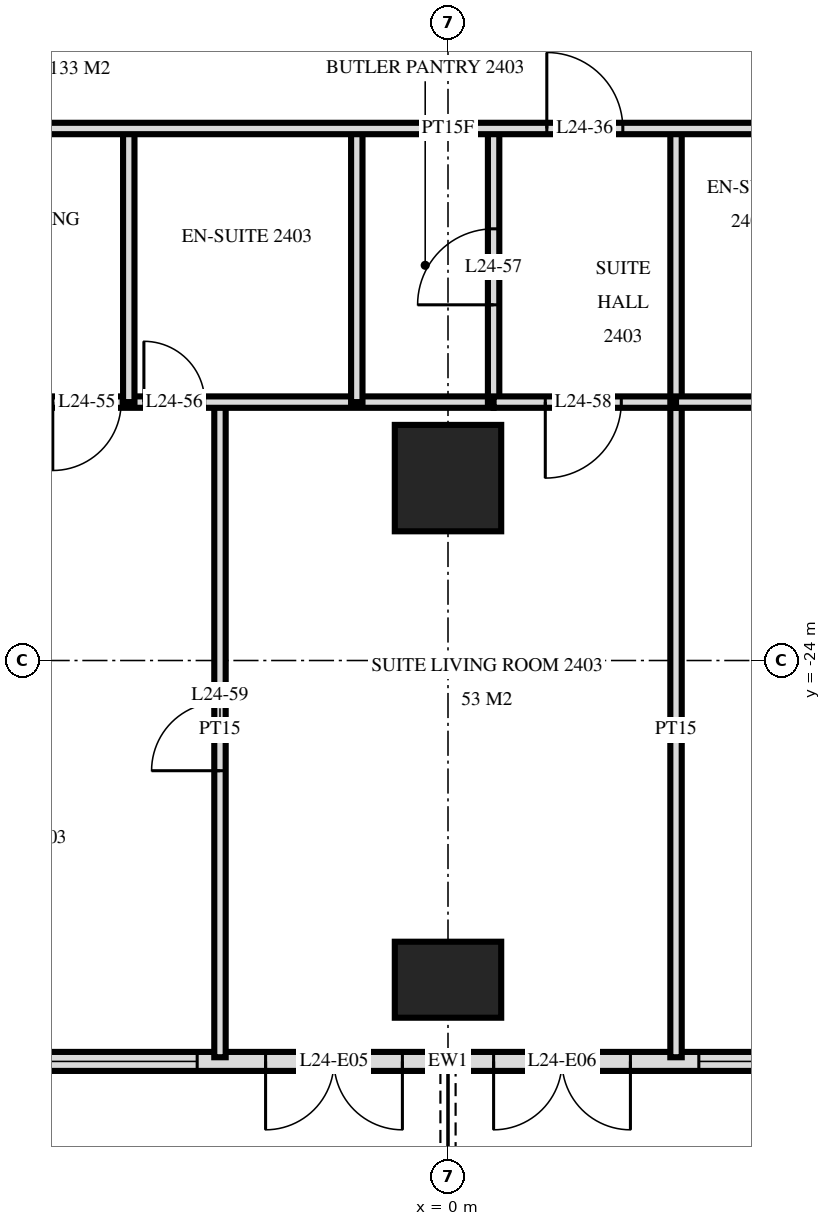
"""IFC4 building model, lengths in metres.
Left out: names, types, materials, properties, quantities, classifications, styles, units other than length and angle.
Written with IfcOpenShell. Run it as: python <this file> out.ifc"""

import sys

from ifc_helpers import new_model, si_unit, direction, frame, frame_2d, origin, origin_2d, place, context, subcontext, project, spatial, rectangle, extrude, element, fill, save


model = new_model("IFC4")
c1 = context("Model", 3, precision=1e-05, world=origin(), true_north=direction((0.0, 1.0)))
c2 = subcontext(c1, "Body", "Model", "MODEL_VIEW")
j1 = project(units=[si_unit("LENGTHUNIT", "METRE"), si_unit("PLANEANGLEUNIT", "RADIAN")], contexts=[c1])
p1 = place(None, origin())
s1 = spatial("IfcSite", under=j1, at=p1, CompositionType="ELEMENT")
p2 = place(p1, origin())
s2 = spatial("IfcBuilding", under=s1, at=p2, CompositionType="ELEMENT")
p3 = place(p2, frame((0.0, 0.0, 96.0)))
s3 = spatial("IfcBuildingStorey", under=s2, at=p3, CompositionType="ELEMENT", Elevation=96.0)
p4 = place(p3, frame((0.0, -28.2, 0.0), z_axis=(0.0, 0.0, 1.0), x_axis=(1.0, 0.0, 0.0)))
e1 = element("IfcColumn", 1, at=p4, inside=s3, PredefinedType="COLUMN", context=c2, shape_type="SweptSolid", body=[
    extrude(rectangle(XDim=1.4, YDim=1.0, at=origin_2d()), origin(), (0.0, 0.0, 1.0), 3.6),
])
p5 = place(p3, frame((0.0, -21.6, 0.0), z_axis=(0.0, 0.0, 1.0), x_axis=(1.0, 0.0, 0.0)))
e2 = element("IfcColumn", 2, at=p5, inside=s3, PredefinedType="COLUMN", context=c2, shape_type="SweptSolid", body=[
    extrude(rectangle(XDim=1.4, YDim=1.4, at=origin_2d()), origin(), (0.0, 0.0, 1.0), 3.6),
])
p6 = place(p3, frame((-28.775, -29.275, 0.0), z_axis=(0.0, 0.0, 1.0), x_axis=(1.0, 0.0, 0.0)))
e3 = element("IfcWall", 3, at=p6, inside=s3, PredefinedType="SOLIDWALL", context=c2, shape_type="SweptSolid", body=[
    extrude(rectangle(XDim=57.551, YDim=0.25, at=frame_2d((28.775, 0.0))), origin(), (0.0, 0.0, 1.0), 3.32),
])
p7 = place(p6, frame((0.575, 0.0, 0.0)))
e4 = element("IfcOpeningElement", 4, at=p7, cuts=e3, PredefinedType="OPENING", context=c2, shape_type="SweptSolid", body=[
    extrude(rectangle(XDim=1.8, YDim=2.4, at=frame_2d((0.9, 1.2))), frame((0.0, 0.135, 0.0), z_axis=(0.0, -1.0, 0.0), x_axis=(1.0, 0.0, 0.0)), (0.0, 0.0, 1.0), 0.27),
])
p8 = place(p6, frame((5.075, 0.0, 0.3)))
e5 = element("IfcOpeningElement", 5, at=p8, cuts=e3, PredefinedType="OPENING", context=c2, shape_type="SweptSolid", body=[
    extrude(rectangle(XDim=2.4, YDim=2.1, at=frame_2d((1.2, 1.05))), frame((0.0, 0.135, 0.0), z_axis=(0.0, -1.0, 0.0), x_axis=(1.0, 0.0, 0.0)), (0.0, 0.0, 1.0), 0.27),
])
p9 = place(p6, frame((8.375, 0.0, 0.0)))
e6 = element("IfcOpeningElement", 6, at=p9, cuts=e3, PredefinedType="OPENING", context=c2, shape_type="SweptSolid", body=[
    extrude(rectangle(XDim=1.8, YDim=2.4, at=frame_2d((0.9, 1.2))), frame((0.0, 0.135, 0.0), z_axis=(0.0, -1.0, 0.0), x_axis=(1.0, 0.0, 0.0)), (0.0, 0.0, 1.0), 0.27),
])
p10 = place(p6, frame((11.375, 0.0, 0.0)))
e7 = element("IfcOpeningElement", 7, at=p10, cuts=e3, PredefinedType="OPENING", context=c2, shape_type="SweptSolid", body=[
    extrude(rectangle(XDim=1.8, YDim=2.4, at=frame_2d((0.9, 1.2))), frame((0.0, 0.135, 0.0), z_axis=(0.0, -1.0, 0.0), x_axis=(1.0, 0.0, 0.0)), (0.0, 0.0, 1.0), 0.27),
])
p11 = place(p6, frame((14.075, 0.0, 0.3)))
e8 = element("IfcOpeningElement", 8, at=p11, cuts=e3, PredefinedType="OPENING", context=c2, shape_type="SweptSolid", body=[
    extrude(rectangle(XDim=2.4, YDim=2.1, at=frame_2d((1.2, 1.05))), frame((0.0, 0.135, 0.0), z_axis=(0.0, -1.0, 0.0), x_axis=(1.0, 0.0, 0.0)), (0.0, 0.0, 1.0), 0.27),
])
p12 = place(p6, frame((17.375, 0.0, 0.0)))
e9 = element("IfcOpeningElement", 9, at=p12, cuts=e3, PredefinedType="OPENING", context=c2, shape_type="SweptSolid", body=[
    extrude(rectangle(XDim=1.8, YDim=2.4, at=frame_2d((0.9, 1.2))), frame((0.0, 0.135, 0.0), z_axis=(0.0, -1.0, 0.0), x_axis=(1.0, 0.0, 0.0)), (0.0, 0.0, 1.0), 0.27),
])
p13 = place(p6, frame((20.075, 0.0, 0.3)))
e10 = element("IfcOpeningElement", 10, at=p13, cuts=e3, PredefinedType="OPENING", context=c2, shape_type="SweptSolid", body=[
    extrude(rectangle(XDim=2.4, YDim=2.1, at=frame_2d((1.2, 1.05))), frame((0.0, 0.135, 0.0), z_axis=(0.0, -1.0, 0.0), x_axis=(1.0, 0.0, 0.0)), (0.0, 0.0, 1.0), 0.27),
])
p14 = place(p6, frame((23.075, 0.0, 0.3)))
e11 = element("IfcOpeningElement", 11, at=p14, cuts=e3, PredefinedType="OPENING", context=c2, shape_type="SweptSolid", body=[
    extrude(rectangle(XDim=2.4, YDim=2.1, at=frame_2d((1.2, 1.05))), frame((0.0, 0.135, 0.0), z_axis=(0.0, -1.0, 0.0), x_axis=(1.0, 0.0, 0.0)), (0.0, 0.0, 1.0), 0.27),
])
p15 = place(p6, frame((26.375, 0.0, 0.0)))
e12 = element("IfcOpeningElement", 12, at=p15, cuts=e3, PredefinedType="OPENING", context=c2, shape_type="SweptSolid", body=[
    extrude(rectangle(XDim=1.8, YDim=2.4, at=frame_2d((0.9, 1.2))), frame((0.0, 0.135, 0.0), z_axis=(0.0, -1.0, 0.0), x_axis=(1.0, 0.0, 0.0)), (0.0, 0.0, 1.0), 0.27),
])
p16 = place(p6, frame((29.375, 0.0, 0.0)))
e13 = element("IfcOpeningElement", 13, at=p16, cuts=e3, PredefinedType="OPENING", context=c2, shape_type="SweptSolid", body=[
    extrude(rectangle(XDim=1.8, YDim=2.4, at=frame_2d((0.9, 1.2))), frame((0.0, 0.135, 0.0), z_axis=(0.0, -1.0, 0.0), x_axis=(1.0, 0.0, 0.0)), (0.0, 0.0, 1.0), 0.27),
])
p17 = place(p6, frame((32.075, 0.0, 0.3)))
e14 = element("IfcOpeningElement", 14, at=p17, cuts=e3, PredefinedType="OPENING", context=c2, shape_type="SweptSolid", body=[
    extrude(rectangle(XDim=2.4, YDim=2.1, at=frame_2d((1.2, 1.05))), frame((0.0, 0.135, 0.0), z_axis=(0.0, -1.0, 0.0), x_axis=(1.0, 0.0, 0.0)), (0.0, 0.0, 1.0), 0.27),
])
p18 = place(p6, frame((35.375, 0.0, 0.0)))
e15 = element("IfcOpeningElement", 15, at=p18, cuts=e3, PredefinedType="OPENING", context=c2, shape_type="SweptSolid", body=[
    extrude(rectangle(XDim=1.8, YDim=2.4, at=frame_2d((0.9, 1.2))), frame((0.0, 0.135, 0.0), z_axis=(0.0, -1.0, 0.0), x_axis=(1.0, 0.0, 0.0)), (0.0, 0.0, 1.0), 0.27),
])
p19 = place(p6, frame((38.075, 0.0, 0.3)))
e16 = element("IfcOpeningElement", 16, at=p19, cuts=e3, PredefinedType="OPENING", context=c2, shape_type="SweptSolid", body=[
    extrude(rectangle(XDim=2.4, YDim=2.1, at=frame_2d((1.2, 1.05))), frame((0.0, 0.135, 0.0), z_axis=(0.0, -1.0, 0.0), x_axis=(1.0, 0.0, 0.0)), (0.0, 0.0, 1.0), 0.27),
])
p20 = place(p6, frame((41.075, 0.0, 0.3)))
e17 = element("IfcOpeningElement", 17, at=p20, cuts=e3, PredefinedType="OPENING", context=c2, shape_type="SweptSolid", body=[
    extrude(rectangle(XDim=2.4, YDim=2.1, at=frame_2d((1.2, 1.05))), frame((0.0, 0.135, 0.0), z_axis=(0.0, -1.0, 0.0), x_axis=(1.0, 0.0, 0.0)), (0.0, 0.0, 1.0), 0.27),
])
p21 = place(p6, frame((44.375, 0.0, 0.0)))
e18 = element("IfcOpeningElement", 18, at=p21, cuts=e3, PredefinedType="OPENING", context=c2, shape_type="SweptSolid", body=[
    extrude(rectangle(XDim=1.8, YDim=2.4, at=frame_2d((0.9, 1.2))), frame((0.0, 0.135, 0.0), z_axis=(0.0, -1.0, 0.0), x_axis=(1.0, 0.0, 0.0)), (0.0, 0.0, 1.0), 0.27),
])
p22 = place(p6, frame((47.075, 0.0, 0.3)))
e19 = element("IfcOpeningElement", 19, at=p22, cuts=e3, PredefinedType="OPENING", context=c2, shape_type="SweptSolid", body=[
    extrude(rectangle(XDim=2.4, YDim=2.1, at=frame_2d((1.2, 1.05))), frame((0.0, 0.135, 0.0), z_axis=(0.0, -1.0, 0.0), x_axis=(1.0, 0.0, 0.0)), (0.0, 0.0, 1.0), 0.27),
])
p23 = place(p6, frame((50.375, 0.0, 0.0)))
e20 = element("IfcOpeningElement", 20, at=p23, cuts=e3, PredefinedType="OPENING", context=c2, shape_type="SweptSolid", body=[
    extrude(rectangle(XDim=1.8, YDim=2.4, at=frame_2d((0.9, 1.2))), frame((0.0, 0.135, 0.0), z_axis=(0.0, -1.0, 0.0), x_axis=(1.0, 0.0, 0.0)), (0.0, 0.0, 1.0), 0.27),
])
p24 = place(p6, frame((53.375, 0.0, 0.0)))
e21 = element("IfcOpeningElement", 21, at=p24, cuts=e3, PredefinedType="OPENING", context=c2, shape_type="SweptSolid", body=[
    extrude(rectangle(XDim=1.8, YDim=2.4, at=frame_2d((0.9, 1.2))), frame((0.0, 0.135, 0.0), z_axis=(0.0, -1.0, 0.0), x_axis=(1.0, 0.0, 0.0)), (0.0, 0.0, 1.0), 0.27),
])
p25 = place(p3, frame((3.0, -20.6, 0.0), z_axis=(0.0, 0.0, 1.0), x_axis=(0.0, 1.0, 0.0)))
e22 = element("IfcWall", 22, at=p25, inside=s3, PredefinedType="PARTITIONING", context=c2, shape_type="SweptSolid", body=[
    extrude(rectangle(XDim=3.6, YDim=0.15, at=frame_2d((1.8, 0.0))), origin(), (0.0, 0.0, 1.0), 3.32),
])
p26 = place(p3, frame((3.0, -29.22, 0.0), z_axis=(0.0, 0.0, 1.0), x_axis=(0.0, 1.0, 0.0)))
e23 = element("IfcWall", 23, at=p26, inside=s3, PredefinedType="PARTITIONING", context=c2, shape_type="SweptSolid", body=[
    extrude(rectangle(XDim=8.62, YDim=0.15, at=frame_2d((4.31, 0.0))), origin(), (0.0, 0.0, 1.0), 3.32),
])
p27 = place(p3, frame((0.6, -20.6, 0.0), z_axis=(0.0, 0.0, 1.0), x_axis=(0.0, 1.0, 0.0)))
e24 = element("IfcWall", 24, at=p27, inside=s3, PredefinedType="PARTITIONING", context=c2, shape_type="SweptSolid", body=[
    extrude(rectangle(XDim=3.6, YDim=0.15, at=frame_2d((1.8, 0.0))), origin(), (0.0, 0.0, 1.0), 3.32),
])
p28 = place(p27, frame((1.28, 0.0, 0.0)))
e25 = element("IfcOpeningElement", 25, at=p28, cuts=e24, PredefinedType="OPENING", context=c2, shape_type="SweptSolid", body=[
    extrude(rectangle(XDim=1.0, YDim=2.1, at=frame_2d((0.5, 1.05))), frame((0.0, 0.085, 0.0), z_axis=(0.0, -1.0, 0.0), x_axis=(1.0, 0.0, 0.0)), (0.0, 0.0, 1.0), 0.17),
])
p29 = place(p3, frame((-1.2, -20.6, 0.0), z_axis=(0.0, 0.0, 1.0), x_axis=(0.0, 1.0, 0.0)))
e26 = element("IfcWall", 26, at=p29, inside=s3, PredefinedType="PARTITIONING", context=c2, shape_type="SweptSolid", body=[
    extrude(rectangle(XDim=3.6, YDim=0.15, at=frame_2d((1.8, 0.0))), origin(), (0.0, 0.0, 1.0), 3.32),
])
p30 = place(p3, frame((-3.0, -29.22, 0.0), z_axis=(0.0, 0.0, 1.0), x_axis=(0.0, 1.0, 0.0)))
e27 = element("IfcWall", 27, at=p30, inside=s3, PredefinedType="PARTITIONING", context=c2, shape_type="SweptSolid", body=[
    extrude(rectangle(XDim=8.62, YDim=0.15, at=frame_2d((4.31, 0.0))), origin(), (0.0, 0.0, 1.0), 3.32),
])
p31 = place(p30, frame((3.77, 0.0, 0.0)))
e28 = element("IfcOpeningElement", 28, at=p31, cuts=e27, PredefinedType="OPENING", context=c2, shape_type="SweptSolid", body=[
    extrude(rectangle(XDim=0.9, YDim=2.1, at=frame_2d((0.45, 1.05))), frame((0.0, 0.085, 0.0), z_axis=(0.0, -1.0, 0.0), x_axis=(1.0, 0.0, 0.0)), (0.0, 0.0, 1.0), 0.17),
])
p32 = place(p3, frame((-4.2, -20.6, 0.0), z_axis=(0.0, 0.0, 1.0), x_axis=(0.0, 1.0, 0.0)))
e29 = element("IfcWall", 29, at=p32, inside=s3, PredefinedType="PARTITIONING", context=c2, shape_type="SweptSolid", body=[
    extrude(rectangle(XDim=3.6, YDim=0.15, at=frame_2d((1.8, 0.0))), origin(), (0.0, 0.0, 1.0), 3.32),
])
p33 = place(p3, frame((0.6, -20.6, 0.0), z_axis=(0.0, 0.0, 1.0), x_axis=(1.0, 0.0, 0.0)))
e30 = element("IfcWall", 30, at=p33, inside=s3, PredefinedType="PARTITIONING", context=c2, shape_type="SweptSolid", body=[
    extrude(rectangle(XDim=2.4, YDim=0.15, at=frame_2d((1.2, 0.0))), origin(), (0.0, 0.0, 1.0), 3.32),
])
p34 = place(p33, frame((0.68, 0.0, 0.0)))
e31 = element("IfcOpeningElement", 31, at=p34, cuts=e30, PredefinedType="OPENING", context=c2, shape_type="SweptSolid", body=[
    extrude(rectangle(XDim=1.0, YDim=2.1, at=frame_2d((0.5, 1.05))), frame((0.0, 0.085, 0.0), z_axis=(0.0, -1.0, 0.0), x_axis=(1.0, 0.0, 0.0)), (0.0, 0.0, 1.0), 0.17),
])
p35 = place(p3, frame((-7.2, -20.6, 0.0), z_axis=(0.0, 0.0, 1.0), x_axis=(1.0, 0.0, 0.0)))
e32 = element("IfcWall", 32, at=p35, inside=s3, PredefinedType="PARTITIONING", context=c2, shape_type="SweptSolid", body=[
    extrude(rectangle(XDim=7.8, YDim=0.15, at=frame_2d((3.9, 0.0))), origin(), (0.0, 0.0, 1.0), 3.32),
])
p36 = place(p35, frame((2.0, 0.0, 0.0)))
e33 = element("IfcOpeningElement", 33, at=p36, cuts=e32, PredefinedType="OPENING", context=c2, shape_type="SweptSolid", body=[
    extrude(rectangle(XDim=0.9, YDim=2.1, at=frame_2d((0.45, 1.05))), frame((0.0, 0.085, 0.0), z_axis=(0.0, -1.0, 0.0), x_axis=(1.0, 0.0, 0.0)), (0.0, 0.0, 1.0), 0.17),
])
p37 = place(p35, frame((3.199, 0.0, 0.0)))
e34 = element("IfcOpeningElement", 34, at=p37, cuts=e32, PredefinedType="OPENING", context=c2, shape_type="SweptSolid", body=[
    extrude(rectangle(XDim=0.8, YDim=2.1, at=frame_2d((0.4, 1.05))), frame((0.0, 0.085, 0.0), z_axis=(0.0, -1.0, 0.0), x_axis=(1.0, 0.0, 0.0)), (0.0, 0.0, 1.0), 0.17),
])
p38 = place(p3, frame((3.0, -20.6, 0.0), z_axis=(0.0, 0.0, 1.0), x_axis=(1.0, 0.0, 0.0)))
e35 = element("IfcWall", 35, at=p38, inside=s3, PredefinedType="PARTITIONING", context=c2, shape_type="SweptSolid", body=[
    extrude(rectangle(XDim=2.7, YDim=0.15, at=frame_2d((1.35, 0.0))), origin(), (0.0, 0.0, 1.0), 3.32),
])
p39 = place(p3, frame((-33.12, -17.0, 0.0), z_axis=(0.0, 0.0, 1.0), x_axis=(1.0, 0.0, 0.0)))
e36 = element("IfcWall", 36, at=p39, inside=s3, PredefinedType="PARTITIONING", context=c2, shape_type="SweptSolid", body=[
    extrude(rectangle(XDim=66.24, YDim=0.15, at=frame_2d((33.12, 0.0))), origin(), (0.0, 0.0, 1.0), 3.32),
])
p40 = place(p39, frame((16.27, 0.0, 0.0)))
e37 = element("IfcOpeningElement", 37, at=p40, cuts=e36, PredefinedType="OPENING", context=c2, shape_type="SweptSolid", body=[
    extrude(rectangle(XDim=1.0, YDim=2.1, at=frame_2d((0.5, 1.05))), frame((0.0, 0.085, 0.0), z_axis=(0.0, -1.0, 0.0), x_axis=(1.0, 0.0, 0.0)), (0.0, 0.0, 1.0), 0.17),
])
p41 = place(p39, frame((22.97, 0.0, 0.0)))
e38 = element("IfcOpeningElement", 38, at=p41, cuts=e36, PredefinedType="OPENING", context=c2, shape_type="SweptSolid", body=[
    extrude(rectangle(XDim=1.0, YDim=2.1, at=frame_2d((0.5, 1.05))), frame((0.0, 0.085, 0.0), z_axis=(0.0, -1.0, 0.0), x_axis=(1.0, 0.0, 0.0)), (0.0, 0.0, 1.0), 0.17),
])
p42 = place(p39, frame((34.42, 0.0, 0.0)))
e39 = element("IfcOpeningElement", 39, at=p42, cuts=e36, PredefinedType="OPENING", context=c2, shape_type="SweptSolid", body=[
    extrude(rectangle(XDim=1.0, YDim=2.1, at=frame_2d((0.5, 1.05))), frame((0.0, 0.085, 0.0), z_axis=(0.0, -1.0, 0.0), x_axis=(1.0, 0.0, 0.0)), (0.0, 0.0, 1.0), 0.17),
])
p43 = place(p39, frame((39.22, 0.0, 0.0)))
e40 = element("IfcOpeningElement", 40, at=p43, cuts=e36, PredefinedType="OPENING", context=c2, shape_type="SweptSolid", body=[
    extrude(rectangle(XDim=1.0, YDim=2.1, at=frame_2d((0.5, 1.05))), frame((0.0, 0.085, 0.0), z_axis=(0.0, -1.0, 0.0), x_axis=(1.0, 0.0, 0.0)), (0.0, 0.0, 1.0), 0.17),
])
p44 = place(p39, frame((42.27, 0.0, 0.0)))
e41 = element("IfcOpeningElement", 41, at=p44, cuts=e36, PredefinedType="OPENING", context=c2, shape_type="SweptSolid", body=[
    extrude(rectangle(XDim=1.0, YDim=2.1, at=frame_2d((0.5, 1.05))), frame((0.0, 0.085, 0.0), z_axis=(0.0, -1.0, 0.0), x_axis=(1.0, 0.0, 0.0)), (0.0, 0.0, 1.0), 0.17),
])
p45 = place(p39, frame((45.82, 0.0, 0.0)))
e42 = element("IfcOpeningElement", 42, at=p45, cuts=e36, PredefinedType="OPENING", context=c2, shape_type="SweptSolid", body=[
    extrude(rectangle(XDim=1.0, YDim=2.1, at=frame_2d((0.5, 1.05))), frame((0.0, 0.085, 0.0), z_axis=(0.0, -1.0, 0.0), x_axis=(1.0, 0.0, 0.0)), (0.0, 0.0, 1.0), 0.17),
])
p46 = place(p39, frame((13.42, 0.0, 0.0)))
e43 = element("IfcOpeningElement", 43, at=p46, cuts=e36, PredefinedType="OPENING", context=c2, shape_type="SweptSolid", body=[
    extrude(rectangle(XDim=1.0, YDim=2.1, at=frame_2d((0.5, 1.05))), frame((0.0, 0.085, 0.0), z_axis=(0.0, -1.0, 0.0), x_axis=(1.0, 0.0, 0.0)), (0.0, 0.0, 1.0), 0.17),
])
p47 = place(p39, frame((54.82, 0.0, 0.0)))
e44 = element("IfcOpeningElement", 44, at=p47, cuts=e36, PredefinedType="OPENING", context=c2, shape_type="SweptSolid", body=[
    extrude(rectangle(XDim=1.0, YDim=2.1, at=frame_2d((0.5, 1.05))), frame((0.0, 0.085, 0.0), z_axis=(0.0, -1.0, 0.0), x_axis=(1.0, 0.0, 0.0)), (0.0, 0.0, 1.0), 0.17),
])
p48 = place(p14, origin())
e45 = element("IfcWindow", 45, at=p48, inside=s3, PartitioningType="SINGLE_PANEL", PredefinedType="WINDOW", context=c2, shape_type="SweptSolid", body=[
    extrude(rectangle(XDim=2.4, YDim=2.1, at=frame_2d((1.2, 1.05))), frame((0.0, 0.03, 0.0), z_axis=(0.0, -1.0, 0.0), x_axis=(1.0, 0.0, 0.0)), (0.0, 0.0, 1.0), 0.06),
])
fill(e11, e45)
p49 = place(p15, frame((0.9, 0.0, 0.0), z_axis=(0.0, 0.0, 1.0), x_axis=(-1.0, 0.0, 0.0)))
e46 = element("IfcDoor", 46, at=p49, inside=s3, OperationType="DOUBLE_DOOR_SINGLE_SWING", PredefinedType="DOOR", context=c2, shape_type="SweptSolid", body=[
    extrude(rectangle(XDim=1.8, YDim=2.4, at=frame_2d((0.0, 1.2))), frame((0.0, -0.025, 0.0), z_axis=(0.0, 1.0, 0.0), x_axis=(-1.0, 0.0, 0.0)), (0.0, 0.0, 1.0), 0.05),
])
fill(e12, e46)
p50 = place(p16, frame((0.9, 0.0, 0.0), z_axis=(0.0, 0.0, 1.0), x_axis=(-1.0, 0.0, 0.0)))
e47 = element("IfcDoor", 47, at=p50, inside=s3, OperationType="DOUBLE_DOOR_SINGLE_SWING", PredefinedType="DOOR", context=c2, shape_type="SweptSolid", body=[
    extrude(rectangle(XDim=1.8, YDim=2.4, at=frame_2d((0.0, 1.2))), frame((0.0, -0.025, 0.0), z_axis=(0.0, 1.0, 0.0), x_axis=(-1.0, 0.0, 0.0)), (0.0, 0.0, 1.0), 0.05),
])
fill(e13, e47)
p51 = place(p17, origin())
e48 = element("IfcWindow", 48, at=p51, inside=s3, PartitioningType="SINGLE_PANEL", PredefinedType="WINDOW", context=c2, shape_type="SweptSolid", body=[
    extrude(rectangle(XDim=2.4, YDim=2.1, at=frame_2d((1.2, 1.05))), frame((0.0, 0.03, 0.0), z_axis=(0.0, -1.0, 0.0), x_axis=(1.0, 0.0, 0.0)), (0.0, 0.0, 1.0), 0.06),
])
fill(e14, e48)
p52 = place(p42, origin())
e49 = element("IfcDoor", 49, at=p52, inside=s3, OperationType="SINGLE_SWING_RIGHT", PredefinedType="DOOR", context=c2, shape_type="SweptSolid", body=[
    extrude(rectangle(XDim=1.0, YDim=2.1, at=frame_2d((0.5, 1.05))), frame((0.0, 0.025, 0.0), z_axis=(0.0, -1.0, 0.0), x_axis=(1.0, 0.0, 0.0)), (0.0, 0.0, 1.0), 0.05),
])
fill(e39, e49)
p53 = place(p36, frame((0.45, 0.0, 0.0), z_axis=(0.0, 0.0, 1.0), x_axis=(-1.0, 0.0, 0.0)))
e50 = element("IfcDoor", 50, at=p53, inside=s3, OperationType="SINGLE_SWING_LEFT", PredefinedType="DOOR", context=c2, shape_type="SweptSolid", body=[
    extrude(rectangle(XDim=0.9, YDim=2.1, at=frame_2d((0.0, 1.05))), frame((0.0, -0.025, 0.0), z_axis=(0.0, 1.0, 0.0), x_axis=(-1.0, 0.0, 0.0)), (0.0, 0.0, 1.0), 0.05),
])
fill(e33, e50)
p54 = place(p37, origin())
e51 = element("IfcDoor", 51, at=p54, inside=s3, OperationType="SINGLE_SWING_RIGHT", PredefinedType="DOOR", context=c2, shape_type="SweptSolid", body=[
    extrude(rectangle(XDim=0.8, YDim=2.1, at=frame_2d((0.4, 1.05))), frame((0.0, 0.025, 0.0), z_axis=(0.0, -1.0, 0.0), x_axis=(1.0, 0.0, 0.0)), (0.0, 0.0, 1.0), 0.05),
])
fill(e34, e51)
p55 = place(p28, origin())
e52 = element("IfcDoor", 52, at=p55, inside=s3, OperationType="SINGLE_SWING_RIGHT", PredefinedType="DOOR", context=c2, shape_type="SweptSolid", body=[
    extrude(rectangle(XDim=1.0, YDim=2.1, at=frame_2d((0.5, 1.05))), frame((0.0, 0.025, 0.0), z_axis=(0.0, -1.0, 0.0), x_axis=(1.0, 0.0, 0.0)), (0.0, 0.0, 1.0), 0.05),
])
fill(e25, e52)
p56 = place(p34, frame((0.5, 0.0, 0.0), z_axis=(0.0, 0.0, 1.0), x_axis=(-1.0, 0.0, 0.0)))
e53 = element("IfcDoor", 53, at=p56, inside=s3, OperationType="SINGLE_SWING_LEFT", PredefinedType="DOOR", context=c2, shape_type="SweptSolid", body=[
    extrude(rectangle(XDim=1.0, YDim=2.1, at=frame_2d((0.0, 1.05))), frame((0.0, -0.025, 0.0), z_axis=(0.0, 1.0, 0.0), x_axis=(-1.0, 0.0, 0.0)), (0.0, 0.0, 1.0), 0.05),
])
fill(e31, e53)
p57 = place(p31, origin())
e54 = element("IfcDoor", 54, at=p57, inside=s3, OperationType="SINGLE_SWING_RIGHT", PredefinedType="DOOR", context=c2, shape_type="SweptSolid", body=[
    extrude(rectangle(XDim=0.9, YDim=2.1, at=frame_2d((0.45, 1.05))), frame((0.0, 0.025, 0.0), z_axis=(0.0, -1.0, 0.0), x_axis=(1.0, 0.0, 0.0)), (0.0, 0.0, 1.0), 0.05),
])
fill(e28, e54)
save(model, sys.argv[1])
